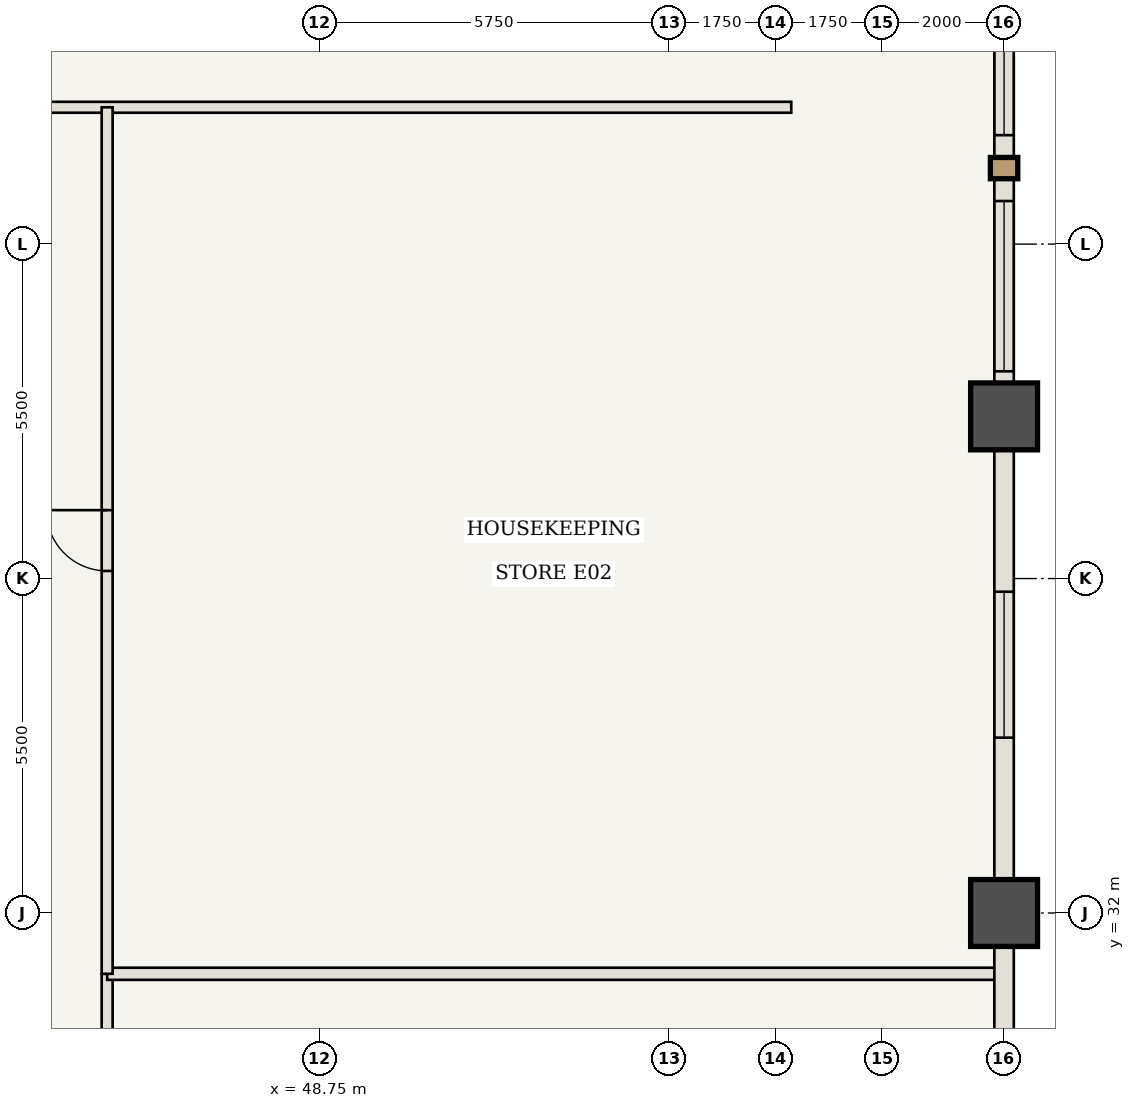
"""IFC4 building model, lengths in metres.
Left out: names, types, materials, properties, quantities, classifications, styles, units other than length and angle.
Written with IfcOpenShell. Run it as: python <this file> out.ifc"""

import sys

from ifc_helpers import new_model, si_unit, direction, frame, frame_2d, origin, origin_2d, place, context, subcontext, project, spatial, rectangle, extrude, element, fill, save


model = new_model("IFC4")
c1 = context("Model", 3, precision=1e-05, world=origin(), true_north=direction((0.0, 1.0)))
c2 = subcontext(c1, "Body", "Model", "MODEL_VIEW")
j1 = project(units=[si_unit("LENGTHUNIT", "METRE"), si_unit("PLANEANGLEUNIT", "RADIAN")], contexts=[c1])
p1 = place(None, origin())
s1 = spatial("IfcSite", under=j1, at=p1, CompositionType="ELEMENT")
p2 = place(p1, origin())
s2 = spatial("IfcBuilding", under=s1, at=p2, CompositionType="ELEMENT")
p3 = place(p2, frame((0.0, 0.0, 85.75)))
s3 = spatial("IfcBuildingStorey", under=s2, at=p3, CompositionType="ELEMENT", Elevation=85.75)
for number, where, z_axis, x_axis in (
    (1, (60.0, 32.0, 0.0), (0.0, 0.0, 1.0), (1.0, 0.0, 0.0)),
    (2, (60.0, 40.167, 0.0), (0.0, 0.0, 1.0), (1.0, 0.0, 0.0)),
):
    element("IfcColumn", number, at=place(p3, frame(where, z_axis=z_axis, x_axis=x_axis)), inside=s3, PredefinedType="COLUMN", context=c2, shape_type="SweptSolid", body=[
        extrude(rectangle(XDim=1.1, YDim=1.1, at=origin_2d()), origin(), (0.0, 0.0, 1.0), 3.5),
    ])
p4 = place(p3, frame((36.8, 45.25, 0.0), z_axis=(0.0, 0.0, 1.0), x_axis=(1.0, 0.0, 0.0)))
e3 = element("IfcWall", 3, at=p4, inside=s3, PredefinedType="STANDARD", context=c2, shape_type="SweptSolid", body=[
    extrude(rectangle(XDim=19.7, YDim=0.18, at=frame_2d((9.85, 0.0))), origin(), (0.0, 0.0, 1.0), 3.32),
])
p5 = place(p4, frame((3.7, 0.0, 0.0)))
e4 = element("IfcOpeningElement", 4, at=p5, cuts=e3, PredefinedType="OPENING", context=c2, shape_type="SweptSolid", body=[
    extrude(rectangle(XDim=1.0, YDim=2.15, at=frame_2d((0.5, 1.075))), frame((0.0, 0.1, 0.0), z_axis=(0.0, -1.0, 0.0), x_axis=(1.0, 0.0, 0.0)), (0.0, 0.0, 1.0), 0.2),
])
p6 = place(p3, frame((45.25, 18.75, 0.0), z_axis=(0.0, 0.0, 1.0), x_axis=(0.0, 1.0, 0.0)))
e5 = element("IfcWall", 5, at=p6, inside=s3, PredefinedType="STANDARD", context=c2, shape_type="SweptSolid", body=[
    extrude(rectangle(XDim=12.25, YDim=0.18, at=frame_2d((6.125, 0.0))), origin(), (0.0, 0.0, 1.0), 3.32),
])
p7 = place(p6, frame((5.625, 0.0, 0.0)))
e6 = element("IfcOpeningElement", 6, at=p7, cuts=e5, PredefinedType="OPENING", context=c2, shape_type="SweptSolid", body=[
    extrude(rectangle(XDim=1.0, YDim=2.15, at=frame_2d((0.5, 1.075))), frame((0.0, 0.1, 0.0), z_axis=(0.0, -1.0, 0.0), x_axis=(1.0, 0.0, 0.0)), (0.0, 0.0, 1.0), 0.2),
])
p8 = place(p3, frame((45.25, 31.0, 0.0), z_axis=(0.0, 0.0, 1.0), x_axis=(1.0, 0.0, 0.0)))
e7 = element("IfcWall", 7, at=p8, inside=s3, PredefinedType="STANDARD", context=c2, shape_type="SweptSolid", body=[
    extrude(rectangle(XDim=14.69, YDim=0.2, at=frame_2d((7.345, 0.0))), origin(), (0.0, 0.0, 1.0), 3.32),
])
p9 = place(p3, frame((45.25, 31.0, 0.0), z_axis=(0.0, 0.0, 1.0), x_axis=(0.0, 1.0, 0.0)))
e8 = element("IfcWall", 8, at=p9, inside=s3, PredefinedType="STANDARD", context=c2, shape_type="SweptSolid", body=[
    extrude(rectangle(XDim=14.25, YDim=0.18, at=frame_2d((7.125, 0.0))), origin(), (0.0, 0.0, 1.0), 3.32),
])
p10 = place(p9, frame((6.625, 0.0, 0.0)))
e9 = element("IfcOpeningElement", 9, at=p10, cuts=e8, PredefinedType="OPENING", context=c2, shape_type="SweptSolid", body=[
    extrude(rectangle(XDim=1.0, YDim=2.15, at=frame_2d((0.5, 1.075))), frame((0.0, 0.1, 0.0), z_axis=(0.0, -1.0, 0.0), x_axis=(1.0, 0.0, 0.0)), (0.0, 0.0, 1.0), 0.2),
])
p11 = place(p3, frame((60.0, 32.0, 0.0), z_axis=(0.0, 0.0, 1.0), x_axis=(0.0, -1.0, 0.0)))
e10 = element("IfcWall", 10, at=p11, inside=s3, PredefinedType="USERDEFINED", context=c2, shape_type="SweptSolid", body=[
    extrude(rectangle(XDim=8.167, YDim=0.32, at=frame_2d((4.083, 0.0))), origin(), (0.0, 0.0, 1.0), 2.52),
])
p12 = place(p11, frame((3.233, 0.0, 0.85)))
e11 = element("IfcOpeningElement", 11, at=p12, cuts=e10, PredefinedType="OPENING", context=c2, shape_type="SweptSolid", body=[
    extrude(rectangle(XDim=2.4, YDim=1.47, at=frame_2d((1.2, 0.735))), frame((0.0, 0.17, 0.0), z_axis=(0.0, -1.0, 0.0), x_axis=(1.0, 0.0, 0.0)), (0.0, 0.0, 1.0), 0.34),
])
p13 = place(p3, frame((60.0, 40.167, 0.0), z_axis=(0.0, 0.0, 1.0), x_axis=(0.0, -1.0, 0.0)))
e12 = element("IfcWall", 12, at=p13, inside=s3, PredefinedType="USERDEFINED", context=c2, shape_type="SweptSolid", body=[
    extrude(rectangle(XDim=8.167, YDim=0.32, at=frame_2d((4.083, 0.0))), origin(), (0.0, 0.0, 1.0), 2.52),
])
p14 = place(p13, frame((2.883, 0.0, 0.85)))
e13 = element("IfcOpeningElement", 13, at=p14, cuts=e12, PredefinedType="OPENING", context=c2, shape_type="SweptSolid", body=[
    extrude(rectangle(XDim=2.4, YDim=1.47, at=frame_2d((1.2, 0.735))), frame((0.0, 0.17, 0.0), z_axis=(0.0, -1.0, 0.0), x_axis=(1.0, 0.0, 0.0)), (0.0, 0.0, 1.0), 0.34),
])
p15 = place(p3, frame((60.0, 48.333, 0.0), z_axis=(0.0, 0.0, 1.0), x_axis=(0.0, -1.0, 0.0)))
e14 = element("IfcWall", 14, at=p15, inside=s3, PredefinedType="USERDEFINED", context=c2, shape_type="SweptSolid", body=[
    extrude(rectangle(XDim=8.167, YDim=0.32, at=frame_2d((4.083, 0.0))), origin(), (0.0, 0.0, 1.0), 2.52),
])
p16 = place(p15, frame((0.742, 0.0, 0.85)))
e15 = element("IfcOpeningElement", 15, at=p16, cuts=e14, PredefinedType="OPENING", context=c2, shape_type="SweptSolid", body=[
    extrude(rectangle(XDim=2.8, YDim=1.47, at=frame_2d((1.4, 0.735))), frame((0.0, 0.17, 0.0), z_axis=(0.0, -1.0, 0.0), x_axis=(1.0, 0.0, 0.0)), (0.0, 0.0, 1.0), 0.34),
])
p17 = place(p15, frame((4.625, 0.0, 0.85)))
e16 = element("IfcOpeningElement", 16, at=p17, cuts=e14, PredefinedType="OPENING", context=c2, shape_type="SweptSolid", body=[
    extrude(rectangle(XDim=2.8, YDim=1.47, at=frame_2d((1.4, 0.735))), frame((0.0, 0.17, 0.0), z_axis=(0.0, -1.0, 0.0), x_axis=(1.0, 0.0, 0.0)), (0.0, 0.0, 1.0), 0.34),
])
p18 = place(p10, origin())
e17 = element("IfcDoor", 17, at=p18, inside=s3, OperationType="SINGLE_SWING_RIGHT", PredefinedType="DOOR", context=c2, shape_type="SweptSolid", body=[
    extrude(rectangle(XDim=1.0, YDim=2.15, at=frame_2d((0.5, 1.075))), frame((0.0, 0.025, 0.0), z_axis=(0.0, -1.0, 0.0), x_axis=(1.0, 0.0, 0.0)), (0.0, 0.0, 1.0), 0.05),
])
fill(e9, e17)
p19 = place(p14, origin())
e18 = element("IfcWindow", 18, at=p19, inside=s3, PartitioningType="SINGLE_PANEL", PredefinedType="WINDOW", context=c2, shape_type="SweptSolid", body=[
    extrude(rectangle(XDim=2.4, YDim=1.47, at=frame_2d((1.2, 0.735))), frame((0.0, 0.03, 0.0), z_axis=(0.0, -1.0, 0.0), x_axis=(1.0, 0.0, 0.0)), (0.0, 0.0, 1.0), 0.06),
])
fill(e13, e18)
p20 = place(p16, origin())
e19 = element("IfcWindow", 19, at=p20, inside=s3, PartitioningType="SINGLE_PANEL", PredefinedType="WINDOW", context=c2, shape_type="SweptSolid", body=[
    extrude(rectangle(XDim=2.8, YDim=1.47, at=frame_2d((1.4, 0.735))), frame((0.0, 0.03, 0.0), z_axis=(0.0, -1.0, 0.0), x_axis=(1.0, 0.0, 0.0)), (0.0, 0.0, 1.0), 0.06),
])
fill(e15, e19)
p21 = place(p17, origin())
e20 = element("IfcWindow", 20, at=p21, inside=s3, PartitioningType="SINGLE_PANEL", PredefinedType="WINDOW", context=c2, shape_type="SweptSolid", body=[
    extrude(rectangle(XDim=2.8, YDim=1.47, at=frame_2d((1.4, 0.735))), frame((0.0, 0.03, 0.0), z_axis=(0.0, -1.0, 0.0), x_axis=(1.0, 0.0, 0.0)), (0.0, 0.0, 1.0), 0.06),
])
fill(e16, e20)
save(model, sys.argv[1])
